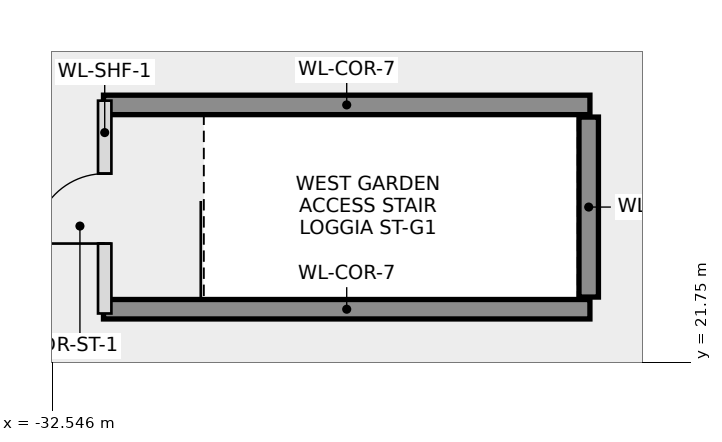
"""IFC4 building model, lengths in metres.
Left out: names, types, materials, properties, quantities, classifications, styles, units other than length and angle.
Written with IfcOpenShell. Run it as: python <this file> out.ifc"""

import sys

from ifc_helpers import new_model, si_unit, direction, frame, frame_2d, origin, place, context, subcontext, project, spatial, rectangle, extrude, element, fill, save


model = new_model("IFC4")
c1 = context("Model", 3, precision=1e-05, world=origin(), true_north=direction((0.0, 1.0)))
c2 = subcontext(c1, "Body", "Model", "MODEL_VIEW")
j1 = project(units=[si_unit("LENGTHUNIT", "METRE"), si_unit("PLANEANGLEUNIT", "RADIAN")], contexts=[c1])
p1 = place(None, origin())
s1 = spatial("IfcSite", under=j1, at=p1, CompositionType="ELEMENT")
p2 = place(p1, origin())
s2 = spatial("IfcBuilding", under=s1, at=p2, CompositionType="ELEMENT")
p3 = place(p2, frame((0.0, 0.0, 20.1)))
s3 = spatial("IfcBuildingStorey", under=s2, at=p3, CompositionType="ELEMENT", Elevation=20.1)
for number, where, z_axis, x_axis in (
    (1, (-31.7, 25.98, 0.0), (0.0, 0.0, 1.0), (1.0, 0.0, 0.0)),
    (2, (-31.7, 22.62, 0.0), (0.0, 0.0, 1.0), (1.0, 0.0, 0.0)),
):
    element("IfcWall", number, at=place(p3, frame(where, z_axis=z_axis, x_axis=x_axis)), inside=s3, PredefinedType="SHEAR", context=c2, shape_type="SweptSolid", body=[
        extrude(rectangle(XDim=8.0, YDim=0.32, at=frame_2d((4.0, 0.0))), origin(), (0.0, 0.0, 1.0), 3.52),
    ])
p4 = place(p3, frame((-23.72, 22.82, 0.0), z_axis=(0.0, 0.0, 1.0), x_axis=(0.0, 1.0, 0.0)))
e3 = element("IfcWall", 3, at=p4, inside=s3, PredefinedType="SHEAR", context=c2, shape_type="SweptSolid", body=[
    extrude(rectangle(XDim=2.96, YDim=0.32, at=frame_2d((1.48, 0.0))), origin(), (0.0, 0.0, 1.0), 3.52),
])
p5 = place(p3, frame((-31.68, 22.55, 0.0), z_axis=(0.0, 0.0, 1.0), x_axis=(0.0, 1.0, 0.0)))
e4 = element("IfcWall", 4, at=p5, inside=s3, PredefinedType="PLUMBINGWALL", context=c2, shape_type="SweptSolid", body=[
    extrude(rectangle(XDim=3.5, YDim=0.22, at=frame_2d((1.75, 0.0))), origin(), (0.0, 0.0, 1.0), 3.495),
])
p6 = place(p5, frame((1.15, 0.0, 0.0)))
e5 = element("IfcOpeningElement", 5, at=p6, cuts=e4, PredefinedType="OPENING", context=c2, shape_type="SweptSolid", body=[
    extrude(rectangle(XDim=1.15, YDim=2.15, at=frame_2d((0.575, 1.075))), frame((0.0, 0.12, 0.0), z_axis=(0.0, -1.0, 0.0), x_axis=(1.0, 0.0, 0.0)), (0.0, 0.0, 1.0), 0.24),
])
p7 = place(p6, origin())
e6 = element("IfcDoor", 6, at=p7, inside=s3, OperationType="SINGLE_SWING_LEFT", PredefinedType="DOOR", context=c2, shape_type="SweptSolid", body=[
    extrude(rectangle(XDim=1.15, YDim=2.15, at=frame_2d((0.575, 1.075))), frame((0.0, 0.025, 0.0), z_axis=(0.0, -1.0, 0.0), x_axis=(1.0, 0.0, 0.0)), (0.0, 0.0, 1.0), 0.05),
])
fill(e5, e6)
save(model, sys.argv[1])
